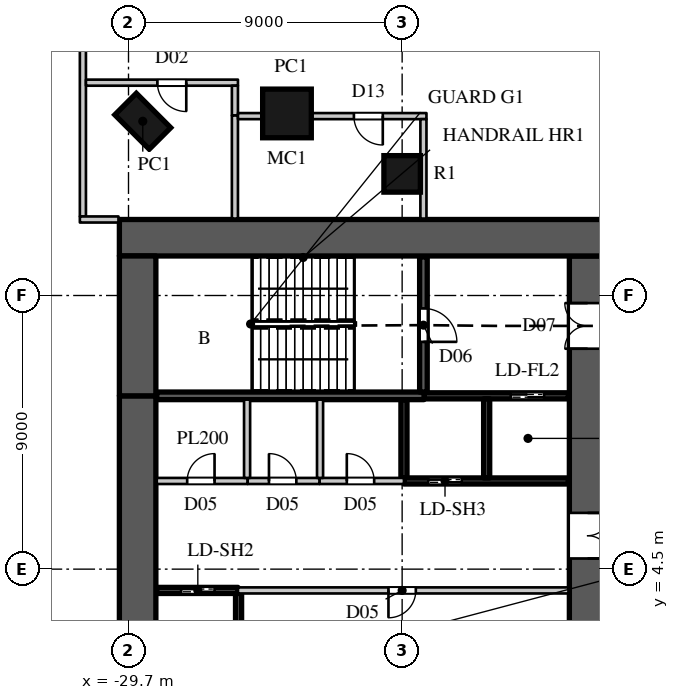
"""IFC4 building model, lengths in metres.
Left out: names, types, materials, properties, quantities, classifications, styles, units other than length and angle.
Written with IfcOpenShell. Run it as: python <this file> out.ifc"""

import sys

from ifc_helpers import new_model, si_unit, direction, frame, frame_2d, origin, origin_2d, place, context, subcontext, project, spatial, rectangle, circle, extrude, element, fill, save


model = new_model("IFC4")
c1 = context("Model", 3, precision=1e-05, world=origin(), true_north=direction((0.0, 1.0)))
c2 = subcontext(c1, "Body", "Model", "MODEL_VIEW")
j1 = project(units=[si_unit("LENGTHUNIT", "METRE"), si_unit("PLANEANGLEUNIT", "RADIAN")], contexts=[c1])
p1 = place(None, origin())
s1 = spatial("IfcSite", under=j1, at=p1, CompositionType="ELEMENT")
p2 = place(p1, origin())
s2 = spatial("IfcBuilding", under=s1, at=p2, CompositionType="ELEMENT")
p3 = place(p2, origin())
s3 = spatial("IfcBuildingStorey", under=s2, at=p3, CompositionType="ELEMENT", Elevation=0.0)
p4 = place(p3, frame((-29.231, 19.231, 0.0), z_axis=(0.0, 0.0, 1.0), x_axis=(-0.707106781187, -0.707106781187, 0.0)))
e1 = element("IfcColumn", 1, at=p4, inside=s3, PredefinedType="COLUMN", context=c2, shape_type="SweptSolid", body=[
    extrude(rectangle(XDim=1.0, YDim=1.6, at=origin_2d()), origin(), (0.0, 0.0, 1.0), 9.0),
])
p5 = place(p3, frame((-24.488, 19.488, 0.0), z_axis=(0.0, 0.0, 1.0), x_axis=(1.0, 0.0, 0.0)))
e2 = element("IfcColumn", 2, at=p5, inside=s3, PredefinedType="COLUMN", context=c2, shape_type="SweptSolid", body=[
    extrude(circle(Radius=0.8, at=origin_2d()), origin(), (0.0, 0.0, 1.0), 9.0),
])
p6 = place(p3, frame((-20.7, 17.5, 0.0), z_axis=(0.0, 0.0, 1.0), x_axis=(1.0, 0.0, 0.0)))
e3 = element("IfcColumn", 3, at=p6, inside=s3, PredefinedType="COLUMN", context=c2, shape_type="SweptSolid", body=[
    extrude(circle(Radius=0.6, at=origin_2d()), origin(), (0.0, 0.0, 1.0), 9.0),
])
p7 = place(p3, frame((-30.0, 15.4, 0.0), z_axis=(0.0, 0.0, 1.0), x_axis=(1.0, 0.0, 0.0)))
e4 = element("IfcWall", 4, at=p7, inside=s3, PredefinedType="SHEAR", context=c2, shape_type="SweptSolid", body=[
    extrude(rectangle(XDim=16.0, YDim=1.2, at=frame_2d((8.0, 0.0))), origin(), (0.0, 0.0, 1.0), 9.0),
])
p8 = place(p3, frame((-14.6, -14.8, 0.0), z_axis=(0.0, 0.0, 1.0), x_axis=(0.0, 1.0, 0.0)))
e5 = element("IfcWall", 5, at=p8, inside=s3, PredefinedType="SHEAR", context=c2, shape_type="SweptSolid", body=[
    extrude(rectangle(XDim=29.6, YDim=1.2, at=frame_2d((14.8, 0.0))), origin(), (0.0, 0.0, 1.0), 9.0),
])
p9 = place(p8, frame((1.55, 0.0, 0.0)))
e6 = element("IfcOpeningElement", 6, at=p9, cuts=e5, PredefinedType="OPENING", context=c2, shape_type="SweptSolid", body=[
    extrude(rectangle(XDim=1.5, YDim=2.4, at=frame_2d((0.75, 1.2))), frame((0.0, 0.61, 0.0), z_axis=(0.0, -1.0, 0.0), x_axis=(1.0, 0.0, 0.0)), (0.0, 0.0, 1.0), 1.22),
])
p10 = place(p8, frame((26.55, 0.0, 0.0)))
e7 = element("IfcOpeningElement", 7, at=p10, cuts=e5, PredefinedType="OPENING", context=c2, shape_type="SweptSolid", body=[
    extrude(rectangle(XDim=1.5, YDim=2.4, at=frame_2d((0.75, 1.2))), frame((0.0, 0.61, 0.0), z_axis=(0.0, -1.0, 0.0), x_axis=(1.0, 0.0, 0.0)), (0.0, 0.0, 1.0), 1.22),
])
p11 = place(p8, frame((8.45, 0.0, 0.0)))
e8 = element("IfcOpeningElement", 8, at=p11, cuts=e5, PredefinedType="OPENING", context=c2, shape_type="SweptSolid", body=[
    extrude(rectangle(XDim=1.5, YDim=2.4, at=frame_2d((0.75, 1.2))), frame((0.0, 0.61, 0.0), z_axis=(0.0, -1.0, 0.0), x_axis=(1.0, 0.0, 0.0)), (0.0, 0.0, 1.0), 1.22),
])
p12 = place(p8, frame((19.65, 0.0, 0.0)))
e9 = element("IfcOpeningElement", 9, at=p12, cuts=e5, PredefinedType="OPENING", context=c2, shape_type="SweptSolid", body=[
    extrude(rectangle(XDim=1.5, YDim=2.4, at=frame_2d((0.75, 1.2))), frame((0.0, 0.61, 0.0), z_axis=(0.0, -1.0, 0.0), x_axis=(1.0, 0.0, 0.0)), (0.0, 0.0, 1.0), 1.22),
])
p13 = place(p8, frame((14.5, 0.0, 0.0)))
e10 = element("IfcOpeningElement", 10, at=p13, cuts=e5, PredefinedType="OPENING", context=c2, shape_type="SweptSolid", body=[
    extrude(rectangle(XDim=0.6, YDim=2.0, at=frame_2d((0.3, 1.0))), frame((0.0, 0.61, 0.0), z_axis=(0.0, -1.0, 0.0), x_axis=(1.0, 0.0, 0.0)), (0.0, 0.0, 1.0), 1.22),
])
p14 = place(p3, frame((-29.4, -10.2, 0.0), z_axis=(0.0, 0.0, 1.0), x_axis=(0.0, 1.0, 0.0)))
e11 = element("IfcWall", 11, at=p14, inside=s3, PredefinedType="SHEAR", context=c2, shape_type="SweptSolid", body=[
    extrude(rectangle(XDim=20.4, YDim=1.2, at=frame_2d((10.2, 0.0))), origin(), (0.0, 0.0, 1.0), 9.0),
])
p15 = place(p3, frame((-29.4, 10.2, 0.0), z_axis=(0.0, 0.0, 1.0), x_axis=(0.0, 1.0, 0.0)))
e12 = element("IfcWall", 12, at=p15, inside=s3, PredefinedType="SHEAR", context=c2, shape_type="SweptSolid", body=[
    extrude(rectangle(XDim=4.6, YDim=1.2, at=frame_2d((2.3, 0.0))), origin(), (0.0, 0.0, 1.0), 9.0),
])
p16 = place(p3, frame((-31.2, 16.1, 0.0), z_axis=(0.0, 0.0, 1.0), x_axis=(0.0, 1.0, 0.0)))
e13 = element("IfcWall", 13, at=p16, inside=s3, PredefinedType="PARTITIONING", context=c2, shape_type="SweptSolid", body=[
    extrude(rectangle(XDim=11.025, YDim=0.2, at=frame_2d((5.512, 0.0))), origin(), (0.0, 0.0, 1.0), 8.598),
])
p17 = place(p3, frame((-31.3, 16.0, 0.0), z_axis=(0.0, 0.0, 1.0), x_axis=(1.0, 0.0, 0.0)))
e14 = element("IfcWall", 14, at=p17, inside=s3, PredefinedType="PARTITIONING", context=c2, shape_type="SweptSolid", body=[
    extrude(rectangle(XDim=1.27, YDim=0.2, at=frame_2d((0.635, 0.0))), origin(), (0.0, 0.0, 1.0), 8.598),
])
p18 = place(p3, frame((-31.1, 20.5, 0.0), z_axis=(0.0, 0.0, 1.0), x_axis=(1.0, 0.0, 0.0)))
e15 = element("IfcWall", 15, at=p18, inside=s3, PredefinedType="PARTITIONING", context=c2, shape_type="SweptSolid", body=[
    extrude(rectangle(XDim=5.0, YDim=0.2, at=frame_2d((2.5, 0.0))), origin(), (0.0, 0.0, 1.0), 8.598),
])
p19 = place(p18, frame((2.35, 0.0, 0.0)))
e16 = element("IfcOpeningElement", 16, at=p19, cuts=e15, PredefinedType="OPENING", context=c2, shape_type="SweptSolid", body=[
    extrude(rectangle(XDim=0.95, YDim=2.2, at=frame_2d((0.475, 1.1))), frame((0.0, 0.11, 0.0), z_axis=(0.0, -1.0, 0.0), x_axis=(1.0, 0.0, 0.0)), (0.0, 0.0, 1.0), 0.22),
])
p20 = place(p3, frame((-28.77, 7.4, 0.0), z_axis=(0.0, 0.0, 1.0), x_axis=(1.0, 0.0, 0.0)))
e17 = element("IfcWall", 17, at=p20, inside=s3, PredefinedType="PARTITIONING", context=c2, shape_type="SweptSolid", body=[
    extrude(rectangle(XDim=2.99, YDim=0.2, at=frame_2d((1.495, 0.0))), origin(), (0.0, 0.0, 1.0), 8.598),
])
p21 = place(p20, frame((1.0, 0.0, 0.0)))
e18 = element("IfcOpeningElement", 18, at=p21, cuts=e17, PredefinedType="OPENING", context=c2, shape_type="SweptSolid", body=[
    extrude(rectangle(XDim=0.9, YDim=2.2, at=frame_2d((0.45, 1.1))), frame((0.0, 0.11, 0.0), z_axis=(0.0, -1.0, 0.0), x_axis=(1.0, 0.0, 0.0)), (0.0, 0.0, 1.0), 0.22),
])
p22 = place(p3, frame((-26.2, 19.42, 0.0), z_axis=(0.0, 0.0, 1.0), x_axis=(0.0, 1.0, 0.0)))
e19 = element("IfcWall", 19, at=p22, inside=s3, PredefinedType="PARTITIONING", context=c2, shape_type="SweptSolid", body=[
    extrude(rectangle(XDim=0.98, YDim=0.2, at=frame_2d((0.49, 0.0))), origin(), (0.0, 0.0, 1.0), 8.598),
])
p23 = place(p3, frame((-23.42, 7.4, 0.0), z_axis=(0.0, 0.0, 1.0), x_axis=(1.0, 0.0, 0.0)))
e20 = element("IfcWall", 20, at=p23, inside=s3, PredefinedType="PARTITIONING", context=c2, shape_type="SweptSolid", body=[
    extrude(rectangle(XDim=2.78, YDim=0.2, at=frame_2d((1.39, 0.0))), origin(), (0.0, 0.0, 1.0), 8.598),
])
p24 = place(p23, frame((0.9, 0.0, 0.0)))
e21 = element("IfcOpeningElement", 21, at=p24, cuts=e20, PredefinedType="OPENING", context=c2, shape_type="SweptSolid", body=[
    extrude(rectangle(XDim=0.9, YDim=2.2, at=frame_2d((0.45, 1.1))), frame((0.0, 0.11, 0.0), z_axis=(0.0, -1.0, 0.0), x_axis=(1.0, 0.0, 0.0)), (0.0, 0.0, 1.0), 0.22),
])
p25 = place(p3, frame((-26.2, 16.03, 0.0), z_axis=(0.0, 0.0, 1.0), x_axis=(0.0, 1.0, 0.0)))
e22 = element("IfcWall", 22, at=p25, inside=s3, PredefinedType="PARTITIONING", context=c2, shape_type="SweptSolid", body=[
    extrude(rectangle(XDim=3.39, YDim=0.2, at=frame_2d((1.695, 0.0))), origin(), (0.0, 0.0, 1.0), 8.598),
])
p26 = place(p3, frame((-26.1, 19.4, 0.0), z_axis=(0.0, 0.0, 1.0), x_axis=(1.0, 0.0, 0.0)))
e23 = element("IfcWall", 23, at=p26, inside=s3, PredefinedType="PARTITIONING", context=c2, shape_type="SweptSolid", body=[
    extrude(rectangle(XDim=0.811, YDim=0.2, at=frame_2d((0.405, 0.0))), origin(), (0.0, 0.0, 1.0), 8.598),
])
p27 = place(p3, frame((-23.687, 19.4, 0.0), z_axis=(0.0, 0.0, 1.0), x_axis=(1.0, 0.0, 0.0)))
e24 = element("IfcWall", 24, at=p27, inside=s3, PredefinedType="PARTITIONING", context=c2, shape_type="SweptSolid", body=[
    extrude(rectangle(XDim=3.787, YDim=0.2, at=frame_2d((1.893, 0.0))), origin(), (0.0, 0.0, 1.0), 8.598),
])
p28 = place(p27, frame((1.4, 0.0, 0.0)))
e25 = element("IfcOpeningElement", 25, at=p28, cuts=e24, PredefinedType="OPENING", context=c2, shape_type="SweptSolid", body=[
    extrude(rectangle(XDim=0.95, YDim=2.2, at=frame_2d((0.475, 1.1))), frame((0.0, 0.11, 0.0), z_axis=(0.0, -1.0, 0.0), x_axis=(1.0, 0.0, 0.0)), (0.0, 0.0, 1.0), 0.22),
])
p29 = place(p3, frame((-26.1, 3.8, 0.0), z_axis=(0.0, 0.0, 1.0), x_axis=(1.0, 0.0, 0.0)))
e26 = element("IfcWall", 26, at=p29, inside=s3, PredefinedType="PARTITIONING", context=c2, shape_type="SweptSolid", body=[
    extrude(rectangle(XDim=10.87, YDim=0.2, at=frame_2d((5.435, 0.0))), origin(), (0.0, 0.0, 1.0), 8.598),
])
p30 = place(p29, frame((4.95, 0.0, 0.0)))
e27 = element("IfcOpeningElement", 27, at=p30, cuts=e26, PredefinedType="OPENING", context=c2, shape_type="SweptSolid", body=[
    extrude(rectangle(XDim=0.9, YDim=2.2, at=frame_2d((0.45, 1.1))), frame((0.0, 0.11, 0.0), z_axis=(0.0, -1.0, 0.0), x_axis=(1.0, 0.0, 0.0)), (0.0, 0.0, 1.0), 0.22),
])
p31 = place(p3, frame((-25.78, 7.4, 0.0), z_axis=(0.0, 0.0, 1.0), x_axis=(1.0, 0.0, 0.0)))
e28 = element("IfcWall", 28, at=p31, inside=s3, PredefinedType="PARTITIONING", context=c2, shape_type="SweptSolid", body=[
    extrude(rectangle(XDim=2.36, YDim=0.2, at=frame_2d((1.18, 0.0))), origin(), (0.0, 0.0, 1.0), 8.598),
])
p32 = place(p31, frame((0.7, 0.0, 0.0)))
e29 = element("IfcOpeningElement", 29, at=p32, cuts=e28, PredefinedType="OPENING", context=c2, shape_type="SweptSolid", body=[
    extrude(rectangle(XDim=0.9, YDim=2.2, at=frame_2d((0.45, 1.1))), frame((0.0, 0.11, 0.0), z_axis=(0.0, -1.0, 0.0), x_axis=(1.0, 0.0, 0.0)), (0.0, 0.0, 1.0), 0.22),
])
for number, where, z_axis, x_axis in (
    (30, (-25.8, 7.5, 0.0), (0.0, 0.0, 1.0), (0.0, 1.0, 0.0)),
    (31, (-23.4, 7.5, 0.0), (0.0, 0.0, 1.0), (0.0, 1.0, 0.0)),
):
    element("IfcWall", number, at=place(p3, frame(where, z_axis=z_axis, x_axis=x_axis)), inside=s3, PredefinedType="PARTITIONING", context=c2, shape_type="SweptSolid", body=[
        extrude(rectangle(XDim=2.575, YDim=0.2, at=frame_2d((1.288, 0.0))), origin(), (0.0, 0.0, 1.0), 8.598),
    ])
p33 = place(p3, frame((-20.0, 16.03, 0.0), z_axis=(0.0, 0.0, 1.0), x_axis=(0.0, 1.0, 0.0)))
e32 = element("IfcWall", 32, at=p33, inside=s3, PredefinedType="PARTITIONING", context=c2, shape_type="SweptSolid", body=[
    extrude(rectangle(XDim=3.27, YDim=0.2, at=frame_2d((1.635, 0.0))), origin(), (0.0, 0.0, 1.0), 8.598),
])
p34 = place(p3, frame((-28.77, 3.8, 0.0), z_axis=(0.0, 0.0, 1.0), x_axis=(1.0, 0.0, 0.0)))
e33 = element("IfcWall", 33, at=p34, inside=s3, PredefinedType="SHEAR", context=c2, shape_type="SweptSolid", body=[
    extrude(rectangle(XDim=2.67, YDim=0.2, at=frame_2d((1.335, 0.0))), origin(), (0.0, 0.0, 1.0), 8.598),
])
p35 = place(p34, frame((0.8, 0.0, 0.0)))
e34 = element("IfcOpeningElement", 34, at=p35, cuts=e33, PredefinedType="OPENING", context=c2, shape_type="SweptSolid", body=[
    extrude(rectangle(XDim=1.1, YDim=2.2, at=frame_2d((0.55, 1.1))), frame((0.0, 0.11, 0.0), z_axis=(0.0, -1.0, 0.0), x_axis=(1.0, 0.0, 0.0)), (0.0, 0.0, 1.0), 0.22),
])
p36 = place(p3, frame((-26.08, 1.1, 0.0), z_axis=(0.0, 0.0, 1.0), x_axis=(0.0, 1.0, 0.0)))
e35 = element("IfcWall", 35, at=p36, inside=s3, PredefinedType="SHEAR", context=c2, shape_type="SweptSolid", body=[
    extrude(rectangle(XDim=2.6, YDim=0.2, at=frame_2d((1.3, 0.0))), origin(), (0.0, 0.0, 1.0), 8.598),
])
p37 = place(p3, frame((-20.64, 7.5, 0.0), z_axis=(0.0, 0.0, 1.0), x_axis=(0.0, 1.0, 0.0)))
e36 = element("IfcWall", 36, at=p37, inside=s3, PredefinedType="SHEAR", context=c2, shape_type="SweptSolid", body=[
    extrude(rectangle(XDim=2.575, YDim=0.2, at=frame_2d((1.288, 0.0))), origin(), (0.0, 0.0, 1.0), 8.598),
])
p38 = place(p3, frame((-20.64, 7.4, 0.0), z_axis=(0.0, 0.0, 1.0), x_axis=(1.0, 0.0, 0.0)))
e37 = element("IfcWall", 37, at=p38, inside=s3, PredefinedType="SHEAR", context=c2, shape_type="SweptSolid", body=[
    extrude(rectangle(XDim=5.41, YDim=0.2, at=frame_2d((2.705, 0.0))), origin(), (0.0, 0.0, 1.0), 8.598),
])
p39 = place(p38, frame((0.8, 0.0, 0.0)))
e38 = element("IfcOpeningElement", 38, at=p39, cuts=e37, PredefinedType="OPENING", context=c2, shape_type="SweptSolid", body=[
    extrude(rectangle(XDim=1.1, YDim=2.2, at=frame_2d((0.55, 1.1))), frame((0.0, 0.11, 0.0), z_axis=(0.0, -1.0, 0.0), x_axis=(1.0, 0.0, 0.0)), (0.0, 0.0, 1.0), 0.22),
])
p40 = place(p3, frame((-19.98, 10.2, 0.0), z_axis=(0.0, 0.0, 1.0), x_axis=(1.0, 0.0, 0.0)))
e39 = element("IfcWall", 39, at=p40, inside=s3, PredefinedType="SHEAR", context=c2, shape_type="SweptSolid", body=[
    extrude(rectangle(XDim=4.75, YDim=0.2, at=frame_2d((2.375, 0.0))), origin(), (0.0, 0.0, 1.0), 8.598),
])
p41 = place(p40, frame((2.85, 0.0, 0.0)))
e40 = element("IfcOpeningElement", 40, at=p41, cuts=e39, PredefinedType="OPENING", context=c2, shape_type="SweptSolid", body=[
    extrude(rectangle(XDim=1.1, YDim=2.2, at=frame_2d((0.55, 1.1))), frame((0.0, 0.11, 0.0), z_axis=(0.0, -1.0, 0.0), x_axis=(1.0, 0.0, 0.0)), (0.0, 0.0, 1.0), 0.22),
])
p42 = place(p3, frame((-17.92, 7.5, 0.0), z_axis=(0.0, 0.0, 1.0), x_axis=(0.0, 1.0, 0.0)))
e41 = element("IfcWall", 41, at=p42, inside=s3, PredefinedType="SHEAR", context=c2, shape_type="SweptSolid", body=[
    extrude(rectangle(XDim=2.6, YDim=0.2, at=frame_2d((1.3, 0.0))), origin(), (0.0, 0.0, 1.0), 9.0),
])
p43 = place(p3, frame((-28.77, 10.2, 0.0), z_axis=(0.0, 0.0, 1.0), x_axis=(1.0, 0.0, 0.0)))
e42 = element("IfcWall", 42, at=p43, inside=s3, PredefinedType="SHEAR", context=c2, shape_type="SweptSolid", body=[
    extrude(rectangle(XDim=8.79, YDim=0.25, at=frame_2d((4.395, 0.0))), origin(), (0.0, 0.0, 1.0), 8.598),
])
p44 = place(p3, frame((-20.0, 10.325, 0.0), z_axis=(0.0, 0.0, 1.0), x_axis=(0.0, 1.0, 0.0)))
e43 = element("IfcWall", 43, at=p44, inside=s3, PredefinedType="SHEAR", context=c2, shape_type="SweptSolid", body=[
    extrude(rectangle(XDim=4.445, YDim=0.25, at=frame_2d((2.223, 0.0))), origin(), (0.0, 0.0, 1.0), 8.598),
])
p45 = place(p44, frame((1.65, 0.0, 0.0)))
e44 = element("IfcOpeningElement", 44, at=p45, cuts=e43, PredefinedType="OPENING", context=c2, shape_type="SweptSolid", body=[
    extrude(rectangle(XDim=1.1, YDim=2.2, at=frame_2d((0.55, 1.1))), frame((0.0, 0.135, 0.0), z_axis=(0.0, -1.0, 0.0), x_axis=(1.0, 0.0, 0.0)), (0.0, 0.0, 1.0), 0.27),
])
p46 = place(p45, origin())
e45 = element("IfcDoor", 45, at=p46, inside=s3, OperationType="SINGLE_SWING_RIGHT", PredefinedType="DOOR", context=c2, shape_type="SweptSolid", body=[
    extrude(rectangle(XDim=1.1, YDim=2.2, at=frame_2d((0.55, 1.1))), frame((0.0, 0.025, 0.0), z_axis=(0.0, -1.0, 0.0), x_axis=(1.0, 0.0, 0.0)), (0.0, 0.0, 1.0), 0.05),
])
fill(e44, e45)
p47 = place(p30, origin())
e46 = element("IfcDoor", 46, at=p47, inside=s3, OperationType="SINGLE_SWING_RIGHT", PredefinedType="DOOR", context=c2, shape_type="SweptSolid", body=[
    extrude(rectangle(XDim=0.9, YDim=2.2, at=frame_2d((0.45, 1.1))), frame((0.0, 0.025, 0.0), z_axis=(0.0, -1.0, 0.0), x_axis=(1.0, 0.0, 0.0)), (0.0, 0.0, 1.0), 0.05),
])
fill(e27, e46)
p48 = place(p21, origin())
e47 = element("IfcDoor", 47, at=p48, inside=s3, OperationType="SINGLE_SWING_RIGHT", PredefinedType="DOOR", context=c2, shape_type="SweptSolid", body=[
    extrude(rectangle(XDim=0.9, YDim=2.2, at=frame_2d((0.45, 1.1))), frame((0.0, 0.025, 0.0), z_axis=(0.0, -1.0, 0.0), x_axis=(1.0, 0.0, 0.0)), (0.0, 0.0, 1.0), 0.05),
])
fill(e18, e47)
p49 = place(p32, origin())
e48 = element("IfcDoor", 48, at=p49, inside=s3, OperationType="SINGLE_SWING_LEFT", PredefinedType="DOOR", context=c2, shape_type="SweptSolid", body=[
    extrude(rectangle(XDim=0.9, YDim=2.2, at=frame_2d((0.45, 1.1))), frame((0.0, 0.025, 0.0), z_axis=(0.0, -1.0, 0.0), x_axis=(1.0, 0.0, 0.0)), (0.0, 0.0, 1.0), 0.05),
])
fill(e29, e48)
p50 = place(p24, origin())
e49 = element("IfcDoor", 49, at=p50, inside=s3, OperationType="SINGLE_SWING_LEFT", PredefinedType="DOOR", context=c2, shape_type="SweptSolid", body=[
    extrude(rectangle(XDim=0.9, YDim=2.2, at=frame_2d((0.45, 1.1))), frame((0.0, 0.025, 0.0), z_axis=(0.0, -1.0, 0.0), x_axis=(1.0, 0.0, 0.0)), (0.0, 0.0, 1.0), 0.05),
])
fill(e21, e49)
p51 = place(p35, origin())
e50 = element("IfcDoor", 50, at=p51, inside=s3, OperationType="DOUBLE_DOOR_SLIDING", PredefinedType="DOOR", context=c2, shape_type="SweptSolid", body=[
    extrude(rectangle(XDim=1.1, YDim=2.2, at=frame_2d((0.55, 1.1))), frame((0.0, 0.025, 0.0), z_axis=(0.0, -1.0, 0.0), x_axis=(1.0, 0.0, 0.0)), (0.0, 0.0, 1.0), 0.05),
])
fill(e34, e50)
p52 = place(p39, origin())
e51 = element("IfcDoor", 51, at=p52, inside=s3, OperationType="DOUBLE_DOOR_SLIDING", PredefinedType="DOOR", context=c2, shape_type="SweptSolid", body=[
    extrude(rectangle(XDim=1.1, YDim=2.2, at=frame_2d((0.55, 1.1))), frame((0.0, 0.025, 0.0), z_axis=(0.0, -1.0, 0.0), x_axis=(1.0, 0.0, 0.0)), (0.0, 0.0, 1.0), 0.05),
])
fill(e38, e51)
p53 = place(p41, origin())
e52 = element("IfcDoor", 52, at=p53, inside=s3, OperationType="DOUBLE_DOOR_SLIDING", PredefinedType="DOOR", context=c2, shape_type="SweptSolid", body=[
    extrude(rectangle(XDim=1.1, YDim=2.2, at=frame_2d((0.55, 1.1))), frame((0.0, 0.025, 0.0), z_axis=(0.0, -1.0, 0.0), x_axis=(1.0, 0.0, 0.0)), (0.0, 0.0, 1.0), 0.05),
])
fill(e40, e52)
p54 = place(p19, origin())
e53 = element("IfcDoor", 53, at=p54, inside=s3, OperationType="SINGLE_SWING_LEFT", PredefinedType="DOOR", context=c2, shape_type="SweptSolid", body=[
    extrude(rectangle(XDim=0.95, YDim=2.2, at=frame_2d((0.475, 1.1))), frame((0.0, 0.025, 0.0), z_axis=(0.0, -1.0, 0.0), x_axis=(1.0, 0.0, 0.0)), (0.0, 0.0, 1.0), 0.05),
])
fill(e16, e53)
p55 = place(p28, origin())
e54 = element("IfcDoor", 54, at=p55, inside=s3, OperationType="SINGLE_SWING_LEFT", PredefinedType="DOOR", context=c2, shape_type="SweptSolid", body=[
    extrude(rectangle(XDim=0.95, YDim=2.2, at=frame_2d((0.475, 1.1))), frame((0.0, 0.025, 0.0), z_axis=(0.0, -1.0, 0.0), x_axis=(1.0, 0.0, 0.0)), (0.0, 0.0, 1.0), 0.05),
])
fill(e25, e54)
p56 = place(p10, origin())
e55 = element("IfcDoor", 55, at=p56, inside=s3, OperationType="DOUBLE_DOOR_SINGLE_SWING", PredefinedType="DOOR", context=c2, shape_type="SweptSolid", body=[
    extrude(rectangle(XDim=1.5, YDim=2.4, at=frame_2d((0.75, 1.2))), frame((0.0, 0.025, 0.0), z_axis=(0.0, -1.0, 0.0), x_axis=(1.0, 0.0, 0.0)), (0.0, 0.0, 1.0), 0.05),
])
fill(e7, e55)
p57 = place(p12, origin())
e56 = element("IfcDoor", 56, at=p57, inside=s3, OperationType="DOUBLE_DOOR_SINGLE_SWING", PredefinedType="DOOR", context=c2, shape_type="SweptSolid", body=[
    extrude(rectangle(XDim=1.5, YDim=2.4, at=frame_2d((0.75, 1.2))), frame((0.0, 0.025, 0.0), z_axis=(0.0, -1.0, 0.0), x_axis=(1.0, 0.0, 0.0)), (0.0, 0.0, 1.0), 0.05),
])
fill(e9, e56)
save(model, sys.argv[1])
